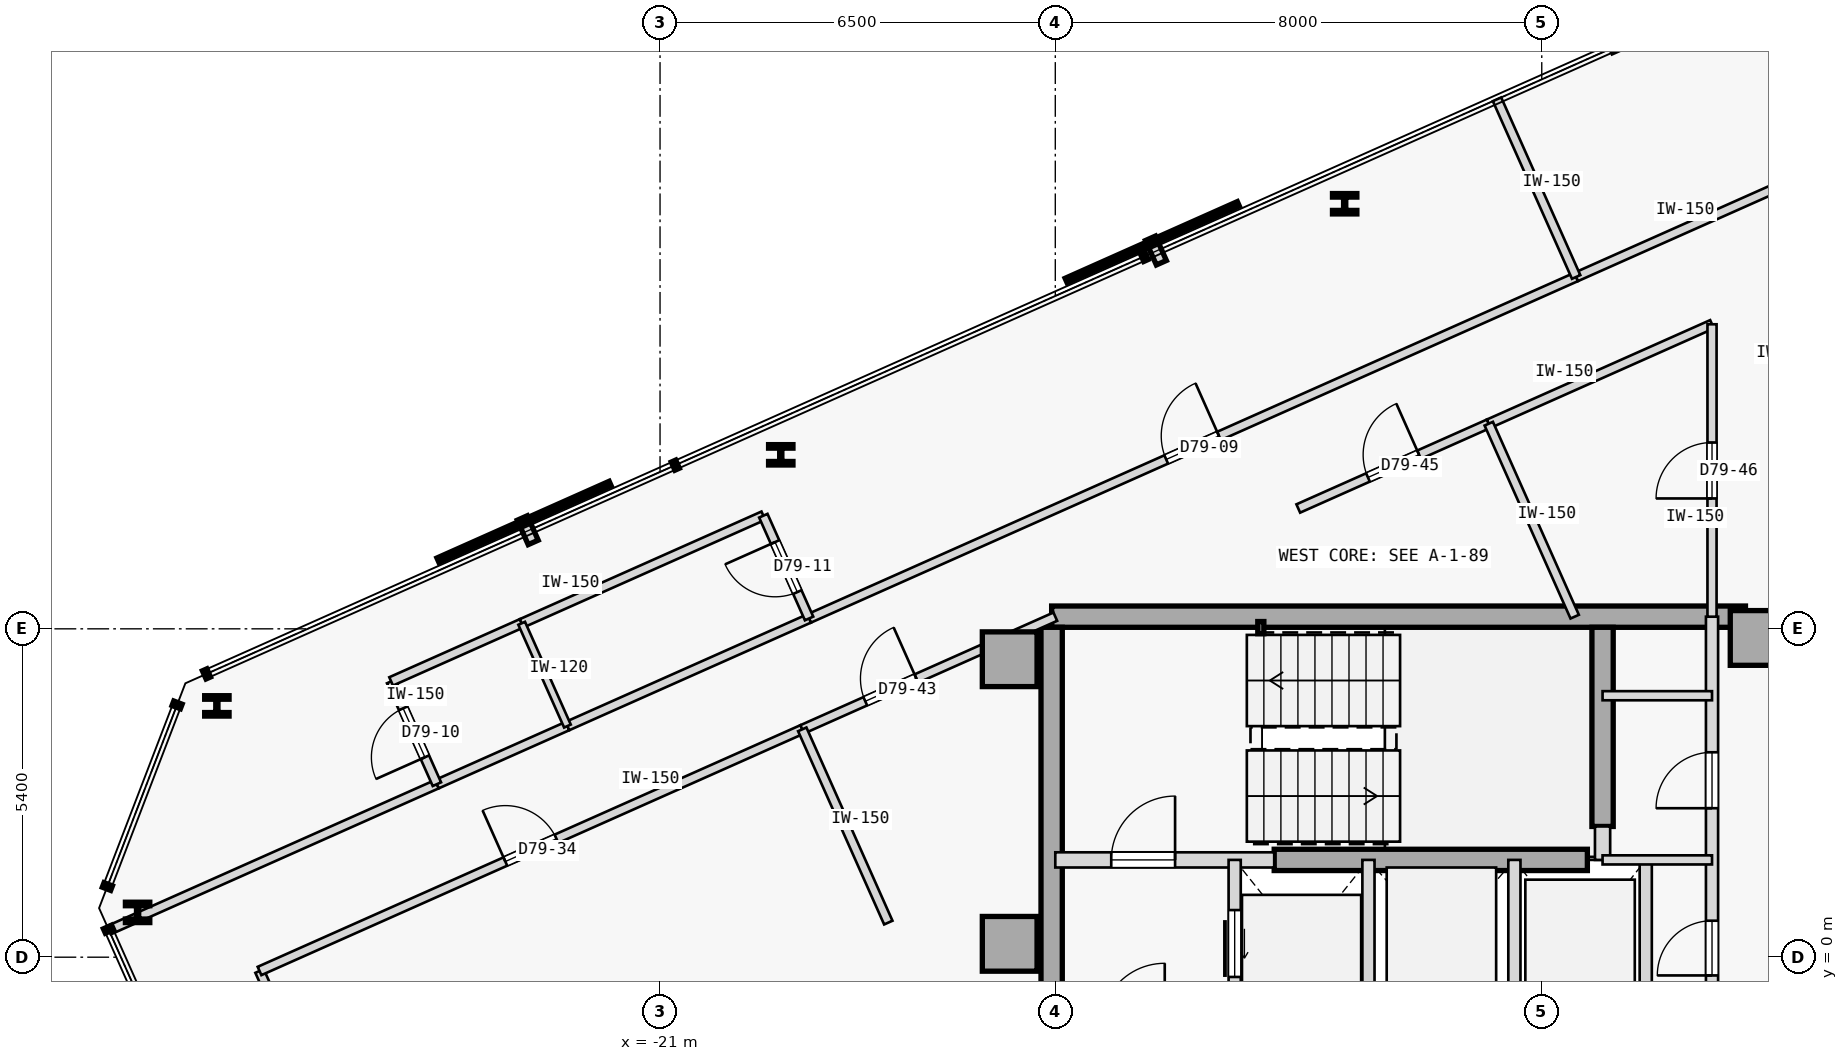
"""IFC4 building model, lengths in metres.
Left out: names, types, materials, properties, quantities, classifications, styles, units other than length and angle.
Written with IfcOpenShell. Run it as: python <this file> out.ifc"""

import sys

from ifc_helpers import new_model, si_unit, direction, frame, frame_2d, origin, origin_2d, place, context, subcontext, project, spatial, rectangle, hollow_rectangle, i_section, extrude, element, fill, save


model = new_model("IFC4")
c1 = context("Model", 3, precision=1e-05, world=origin(), true_north=direction((0.0, 1.0)))
c2 = subcontext(c1, "Body", "Model", "MODEL_VIEW")
j1 = project(units=[si_unit("LENGTHUNIT", "METRE"), si_unit("PLANEANGLEUNIT", "RADIAN")], contexts=[c1])
p1 = place(None, origin())
s1 = spatial("IfcSite", under=j1, at=p1, CompositionType="ELEMENT")
p2 = place(p1, origin())
s2 = spatial("IfcBuilding", under=s1, at=p2, CompositionType="ELEMENT")
p3 = place(p2, frame((0.0, 0.0, 295.3)))
s3 = spatial("IfcBuildingStorey", under=s2, at=p3, CompositionType="ELEMENT", Elevation=295.3)
for number, where, z_axis, x_axis in (
    (1, (-15.25, 4.9, 0.0), (0.0, 0.0, 1.0), (1.0, 0.0, 0.0)),
    (2, (-15.25, 0.22, 0.0), (0.0, 0.0, 1.0), (1.0, 0.0, 0.0)),
    (3, (-2.95, 5.25, 0.0), (0.0, 0.0, 1.0), (1.0, 0.0, 0.0)),
):
    element("IfcColumn", number, at=place(p3, frame(where, z_axis=z_axis, x_axis=x_axis)), inside=s3, PredefinedType="COLUMN", context=c2, shape_type="SweptSolid", body=[
        extrude(rectangle(XDim=0.9, YDim=0.9, at=origin_2d()), origin(), (0.0, 0.0, 1.0), 3.35),
    ])
p4 = place(p3, frame((-14.56, 5.6, 0.0), z_axis=(0.0, 0.0, 1.0), x_axis=(1.0, 0.0, 0.0)))
e4 = element("IfcWall", 4, at=p4, inside=s3, PredefinedType="SHEAR", context=c2, shape_type="SweptSolid", body=[
    extrude(rectangle(XDim=11.41, YDim=0.35, at=frame_2d((5.705, 0.0))), origin(), (0.0, 0.0, 1.0), 3.125),
])
p5 = place(p3, frame((-14.56, -5.425, 0.0), z_axis=(0.0, 0.0, 1.0), x_axis=(0.0, 1.0, 0.0)))
e5 = element("IfcWall", 5, at=p5, inside=s3, PredefinedType="SHEAR", context=c2, shape_type="SweptSolid", body=[
    extrude(rectangle(XDim=10.85, YDim=0.35, at=frame_2d((5.425, 0.0))), origin(), (0.0, 0.0, 1.0), 3.125),
])
p6 = place(p3, frame((-5.5, 2.15, 0.0), z_axis=(0.0, 0.0, 1.0), x_axis=(0.0, 1.0, 0.0)))
e6 = element("IfcWall", 6, at=p6, inside=s3, PredefinedType="SHEAR", context=c2, shape_type="SweptSolid", body=[
    extrude(rectangle(XDim=3.275, YDim=0.35, at=frame_2d((1.638, 0.0))), origin(), (0.0, 0.0, 1.0), 3.125),
])
p7 = place(p3, frame((-10.9, 1.6, 0.0), z_axis=(0.0, 0.0, 1.0), x_axis=(1.0, 0.0, 0.0)))
e7 = element("IfcWall", 7, at=p7, inside=s3, PredefinedType="SHEAR", context=c2, shape_type="SweptSolid", body=[
    extrude(rectangle(XDim=5.15, YDim=0.35, at=frame_2d((2.575, 0.0))), origin(), (0.0, 0.0, 1.0), 3.125),
])
p8 = place(p3, frame((-11.12, 5.42, 0.0), z_axis=(0.0, 0.0, 1.0), x_axis=(1.0, 0.0, 0.0)))
e8 = element("IfcColumn", 8, at=p8, inside=s3, PredefinedType="COLUMN", context=c2, shape_type="SweptSolid", body=[
    extrude(hollow_rectangle(XDim=0.1, YDim=0.2, WallThickness=0.008, at=origin_2d()), origin(), (0.0, 0.0, 1.0), 3.35),
])
for number, where, z_axis, x_axis in (
    (9, (-9.741, 12.39, 0.0), (0.0, 0.0, 1.0), (1.0, 0.0, 0.0)),
    (10, (-19.015, 8.262, 0.0), (0.0, 0.0, 1.0), (1.0, 0.0, 0.0)),
    (11, (-28.288, 4.133, 0.0), (0.0, 0.0, 1.0), (1.0, 0.0, 0.0)),
    (12, (-29.592, 0.737, 0.0), (0.0, 0.0, 1.0), (1.0, 0.0, 0.0)),
):
    element("IfcColumn", number, at=place(p3, frame(where, z_axis=z_axis, x_axis=x_axis)), inside=s3, PredefinedType="COLUMN", context=c2, shape_type="SweptSolid", body=[
        extrude(i_section(OverallWidth=0.401, OverallDepth=0.335, WebThickness=0.036, FlangeThickness=0.058, FilletRadius=0.015, at=origin_2d()), origin(), (0.0, 0.0, 1.0), 3.35),
    ])
p9 = place(p3, frame((-14.5, 1.6, 0.0), z_axis=(0.0, 0.0, 1.0), x_axis=(1.0, 0.0, 0.0)))
e13 = element("IfcWall", 13, at=p9, inside=s3, PredefinedType="STANDARD", context=c2, shape_type="SweptSolid", body=[
    extrude(rectangle(XDim=3.6, YDim=0.25, at=frame_2d((1.8, 0.0))), origin(), (0.0, 0.0, 1.0), 3.125),
])
p10 = place(p9, frame((0.92, 0.0, 0.0)))
e14 = element("IfcOpeningElement", 14, at=p10, cuts=e13, PredefinedType="OPENING", context=c2, shape_type="SweptSolid", body=[
    extrude(rectangle(XDim=1.05, YDim=2.15, at=frame_2d((0.525, 1.075))), frame((0.0, 0.135, 0.0), z_axis=(0.0, -1.0, 0.0), x_axis=(1.0, 0.0, 0.0)), (0.0, 0.0, 1.0), 0.27),
])
p11 = place(p3, frame((-5.5, 1.6, 0.0), z_axis=(0.0, 0.0, 1.0), x_axis=(0.0, 1.0, 0.0)))
e15 = element("IfcWall", 15, at=p11, inside=s3, PredefinedType="STANDARD", context=c2, shape_type="SweptSolid", body=[
    extrude(rectangle(XDim=0.55, YDim=0.25, at=frame_2d((0.275, 0.0))), origin(), (0.0, 0.0, 1.0), 3.125),
])
p12 = place(p3, frame((-3.7, -1.15, 0.0), z_axis=(0.0, 0.0, 1.0), x_axis=(0.0, 1.0, 0.0)))
e16 = element("IfcWall", 16, at=p12, inside=s3, PredefinedType="STANDARD", context=c2, shape_type="SweptSolid", body=[
    extrude(rectangle(XDim=6.75, YDim=0.2, at=frame_2d((3.375, 0.0))), origin(), (0.0, 0.0, 1.0), 3.125),
])
p13 = place(p12, frame((3.6, 0.0, 0.0)))
e17 = element("IfcOpeningElement", 17, at=p13, cuts=e16, PredefinedType="OPENING", context=c2, shape_type="SweptSolid", body=[
    extrude(rectangle(XDim=0.92, YDim=2.15, at=frame_2d((0.46, 1.075))), frame((0.0, 0.11, 0.0), z_axis=(0.0, -1.0, 0.0), x_axis=(1.0, 0.0, 0.0)), (0.0, 0.0, 1.0), 0.22),
])
p14 = place(p12, frame((0.85, 0.0, 0.0)))
e18 = element("IfcOpeningElement", 18, at=p14, cuts=e16, PredefinedType="OPENING", context=c2, shape_type="SweptSolid", body=[
    extrude(rectangle(XDim=0.9, YDim=2.15, at=frame_2d((0.45, 1.075))), frame((0.0, 0.11, 0.0), z_axis=(0.0, -1.0, 0.0), x_axis=(1.0, 0.0, 0.0)), (0.0, 0.0, 1.0), 0.22),
])
p15 = place(p3, frame((-11.55, -1.15, 0.0), z_axis=(0.0, 0.0, 1.0), x_axis=(0.0, 1.0, 0.0)))
e19 = element("IfcWall", 19, at=p15, inside=s3, PredefinedType="STANDARD", context=c2, shape_type="SweptSolid", body=[
    extrude(rectangle(XDim=2.75, YDim=0.2, at=frame_2d((1.375, 0.0))), origin(), (0.0, 0.0, 1.0), 3.125),
])
p16 = place(p15, frame((0.825, 0.0, 0.0)))
e20 = element("IfcOpeningElement", 20, at=p16, cuts=e19, PredefinedType="OPENING", context=c2, shape_type="SweptSolid", body=[
    extrude(rectangle(XDim=1.1, YDim=2.15, at=frame_2d((0.55, 1.075))), frame((0.0, 0.11, 0.0), z_axis=(0.0, -1.0, 0.0), x_axis=(1.0, 0.0, 0.0)), (0.0, 0.0, 1.0), 0.22),
])
for number, where, z_axis, x_axis in (
    (21, (-9.35, -1.15, 0.0), (0.0, 0.0, 1.0), (0.0, 1.0, 0.0)),
    (22, (-6.95, -1.15, 0.0), (0.0, 0.0, 1.0), (0.0, 1.0, 0.0)),
    (23, (-4.79, -1.15, 0.0), (0.0, 0.0, 1.0), (0.0, 1.0, 0.0)),
):
    element("IfcWall", number, at=place(p3, frame(where, z_axis=z_axis, x_axis=x_axis)), inside=s3, PredefinedType="STANDARD", context=c2, shape_type="SweptSolid", body=[
        extrude(rectangle(XDim=2.75, YDim=0.2, at=frame_2d((1.375, 0.0))), origin(), (0.0, 0.0, 1.0), 3.125),
    ])
for number, where, z_axis, x_axis in (
    (24, (-5.5, 4.3, 0.0), (0.0, 0.0, 1.0), (1.0, 0.0, 0.0)),
    (25, (-5.5, 1.6, 0.0), (0.0, 0.0, 1.0), (1.0, 0.0, 0.0)),
):
    element("IfcWall", number, at=place(p3, frame(where, z_axis=z_axis, x_axis=x_axis)), inside=s3, PredefinedType="PARTITIONING", context=c2, shape_type="SweptSolid", body=[
        extrude(rectangle(XDim=1.8, YDim=0.15, at=frame_2d((0.9, 0.0))), origin(), (0.0, 0.0, 1.0), 3.125),
    ])
p17 = place(p3, frame((-30.063, 0.444, 0.0), z_axis=(0.0, 0.0, 1.0), x_axis=(0.913545336501, 0.406736915165, 0.0)))
e26 = element("IfcWall", 26, at=p17, inside=s3, PredefinedType="PARTITIONING", context=c2, shape_type="SweptSolid", body=[
    extrude(rectangle(XDim=5.904, YDim=0.15, at=frame_2d((2.952, 0.0))), origin(), (0.0, 0.0, 1.0), 3.125),
])
p18 = place(p3, frame((-18.549, 5.57, 0.0), z_axis=(0.0, 0.0, 1.0), x_axis=(0.913545955058, 0.40673552586, 0.0)))
e27 = element("IfcWall", 27, at=p18, inside=s3, PredefinedType="PARTITIONING", context=c2, shape_type="SweptSolid", body=[
    extrude(rectangle(XDim=13.808, YDim=0.15, at=frame_2d((6.904, 0.0))), origin(), (0.0, 0.0, 1.0), 3.125),
])
p19 = place(p18, frame((6.429, 0.0, 0.0)))
e28 = element("IfcOpeningElement", 28, at=p19, cuts=e27, PredefinedType="OPENING", context=c2, shape_type="SweptSolid", body=[
    extrude(rectangle(XDim=0.95, YDim=2.15, at=frame_2d((0.475, 1.075))), frame((0.0, 0.085, 0.0), z_axis=(0.0, -1.0, 0.0), x_axis=(1.0, 0.0, 0.0)), (0.0, 0.0, 1.0), 0.17),
])
p20 = place(p3, frame((-24.67, 2.845, 0.0), z_axis=(0.0, 0.0, 1.0), x_axis=(0.913541436194, 0.406745675276, 0.0)))
e29 = element("IfcWall", 29, at=p20, inside=s3, PredefinedType="PARTITIONING", context=c2, shape_type="SweptSolid", body=[
    extrude(rectangle(XDim=2.35, YDim=0.15, at=frame_2d((1.175, 0.0))), origin(), (0.0, 0.0, 1.0), 3.125),
])
p21 = place(p3, frame((-22.523, 3.801, 0.0), z_axis=(0.0, 0.0, 1.0), x_axis=(0.913545193015, 0.406737237438, 0.0)))
e30 = element("IfcWall", 30, at=p21, inside=s3, PredefinedType="PARTITIONING", context=c2, shape_type="SweptSolid", body=[
    extrude(rectangle(XDim=4.35, YDim=0.15, at=frame_2d((2.175, 0.0))), origin(), (0.0, 0.0, 1.0), 3.125),
])
p22 = place(p3, frame((-5.935, 11.187, 0.0), z_axis=(0.0, 0.0, 1.0), x_axis=(0.91354851465, 0.406729776856, 0.0)))
e31 = element("IfcWall", 31, at=p22, inside=s3, PredefinedType="PARTITIONING", context=c2, shape_type="SweptSolid", body=[
    extrude(rectangle(XDim=6.703, YDim=0.15, at=frame_2d((3.352, 0.0))), origin(), (0.0, 0.0, 1.0), 3.125),
])
p23 = place(p3, frame((-24.54, -7.068, 0.0), z_axis=(0.0, 0.0, 1.0), x_axis=(-0.406758457302, 0.913535745011, 0.0)))
e32 = element("IfcWall", 32, at=p23, inside=s3, PredefinedType="PARTITIONING", context=c2, shape_type="SweptSolid", body=[
    extrude(rectangle(XDim=7.489, YDim=0.15, at=frame_2d((3.744, 0.0))), origin(), (0.0, 0.0, 1.0), 3.125),
])
p24 = place(p3, frame((-27.586, -0.227, 0.0), z_axis=(0.0, 0.0, 1.0), x_axis=(0.913542396088, 0.40674351937, 0.0)))
e33 = element("IfcWall", 33, at=p24, inside=s3, PredefinedType="PARTITIONING", context=c2, shape_type="SweptSolid", body=[
    extrude(rectangle(XDim=9.77, YDim=0.15, at=frame_2d((4.885, 0.0))), origin(), (0.0, 0.0, 1.0), 3.125),
])
p25 = place(p24, frame((4.425, 0.0, 0.0)))
e34 = element("IfcOpeningElement", 34, at=p25, cuts=e33, PredefinedType="OPENING", context=c2, shape_type="SweptSolid", body=[
    extrude(rectangle(XDim=0.92, YDim=2.15, at=frame_2d((0.46, 1.075))), frame((0.0, 0.085, 0.0), z_axis=(0.0, -1.0, 0.0), x_axis=(1.0, 0.0, 0.0)), (0.0, 0.0, 1.0), 0.17),
])
p26 = place(p3, frame((-18.661, 3.747, 0.0), z_axis=(0.0, 0.0, 1.0), x_axis=(0.913535055583, 0.40676000568, 0.0)))
e35 = element("IfcWall", 35, at=p26, inside=s3, PredefinedType="PARTITIONING", context=c2, shape_type="SweptSolid", body=[
    extrude(rectangle(XDim=4.555, YDim=0.15, at=frame_2d((2.277, 0.0))), origin(), (0.0, 0.0, 1.0), 3.125),
])
p27 = place(p26, frame((1.134, 0.0, 0.0)))
e36 = element("IfcOpeningElement", 36, at=p27, cuts=e35, PredefinedType="OPENING", context=c2, shape_type="SweptSolid", body=[
    extrude(rectangle(XDim=0.92, YDim=2.15, at=frame_2d((0.46, 1.075))), frame((0.0, 0.085, 0.0), z_axis=(0.0, -1.0, 0.0), x_axis=(1.0, 0.0, 0.0)), (0.0, 0.0, 1.0), 0.17),
])
p28 = place(p3, frame((-10.504, 7.379, 0.0), z_axis=(0.0, 0.0, 1.0), x_axis=(0.913526514415, 0.406779187596, 0.0)))
e37 = element("IfcWall", 37, at=p28, inside=s3, PredefinedType="PARTITIONING", context=c2, shape_type="SweptSolid", body=[
    extrude(rectangle(XDim=3.429, YDim=0.15, at=frame_2d((1.714, 0.0))), origin(), (0.0, 0.0, 1.0), 3.125),
])
p29 = place(p28, frame((1.254, 0.0, 0.0)))
e38 = element("IfcOpeningElement", 38, at=p29, cuts=e37, PredefinedType="OPENING", context=c2, shape_type="SweptSolid", body=[
    extrude(rectangle(XDim=0.92, YDim=2.15, at=frame_2d((0.46, 1.075))), frame((0.0, 0.085, 0.0), z_axis=(0.0, -1.0, 0.0), x_axis=(1.0, 0.0, 0.0)), (0.0, 0.0, 1.0), 0.17),
])
p30 = place(p3, frame((-7.372, 8.774, 0.0), z_axis=(0.0, 0.0, 1.0), x_axis=(0.913563383118, 0.406696379412, 0.0)))
e39 = element("IfcWall", 39, at=p30, inside=s3, PredefinedType="PARTITIONING", context=c2, shape_type="SweptSolid", body=[
    extrude(rectangle(XDim=4.019, YDim=0.15, at=frame_2d((2.01, 0.0))), origin(), (0.0, 0.0, 1.0), 3.125),
])
p31 = place(p3, frame((-3.7, 5.6, 0.0), z_axis=(0.0, 0.0, 1.0), x_axis=(5.077173e-05, 0.999999998711, 0.0)))
e40 = element("IfcWall", 40, at=p31, inside=s3, PredefinedType="PARTITIONING", context=c2, shape_type="SweptSolid", body=[
    extrude(rectangle(XDim=4.809, YDim=0.15, at=frame_2d((2.404, 0.0))), origin(), (0.0, 0.0, 1.0), 3.125),
])
p32 = place(p31, frame((1.944, 0.0, 0.0)))
e41 = element("IfcOpeningElement", 41, at=p32, cuts=e40, PredefinedType="OPENING", context=c2, shape_type="SweptSolid", body=[
    extrude(rectangle(XDim=0.92, YDim=2.15, at=frame_2d((0.46, 1.075))), frame((0.0, 0.085, 0.0), z_axis=(0.0, -1.0, 0.0), x_axis=(1.0, 0.0, 0.0)), (0.0, 0.0, 1.0), 0.17),
])
p33 = place(p3, frame((-24.67, 2.845, 0.0), z_axis=(0.0, 0.0, 1.0), x_axis=(-0.406701600856, 0.913561058639, 0.0)))
e42 = element("IfcWall", 42, at=p33, inside=s3, PredefinedType="PARTITIONING", context=c2, shape_type="SweptSolid", body=[
    extrude(rectangle(XDim=1.85, YDim=0.15, at=frame_2d((0.925, 0.0))), origin(), (0.0, 0.0, 1.0), 3.125),
])
p34 = place(p33, frame((0.485, 0.0, 0.0)))
e43 = element("IfcOpeningElement", 43, at=p34, cuts=e42, PredefinedType="OPENING", context=c2, shape_type="SweptSolid", body=[
    extrude(rectangle(XDim=0.88, YDim=2.15, at=frame_2d((0.44, 1.075))), frame((0.0, 0.085, 0.0), z_axis=(0.0, -1.0, 0.0), x_axis=(1.0, 0.0, 0.0)), (0.0, 0.0, 1.0), 0.17),
])
p35 = place(p3, frame((-25.422, 4.535, 0.0), z_axis=(0.0, 0.0, 1.0), x_axis=(0.913541436194, 0.406745675276, 0.0)))
e44 = element("IfcWall", 44, at=p35, inside=s3, PredefinedType="PARTITIONING", context=c2, shape_type="SweptSolid", body=[
    extrude(rectangle(XDim=2.35, YDim=0.15, at=frame_2d((1.175, 0.0))), origin(), (0.0, 0.0, 1.0), 3.125),
])
p36 = place(p3, frame((-23.275, 5.491, 0.0), z_axis=(0.0, 0.0, 1.0), x_axis=(0.913545193015, 0.406737237438, 0.0)))
e45 = element("IfcWall", 45, at=p36, inside=s3, PredefinedType="PARTITIONING", context=c2, shape_type="SweptSolid", body=[
    extrude(rectangle(XDim=4.35, YDim=0.15, at=frame_2d((2.175, 0.0))), origin(), (0.0, 0.0, 1.0), 3.125),
])
p37 = place(p3, frame((-18.549, 5.57, 0.0), z_axis=(0.0, 0.0, 1.0), x_axis=(-0.406701600856, 0.913561058639, 0.0)))
e46 = element("IfcWall", 46, at=p37, inside=s3, PredefinedType="PARTITIONING", context=c2, shape_type="SweptSolid", body=[
    extrude(rectangle(XDim=1.85, YDim=0.15, at=frame_2d((0.925, 0.0))), origin(), (0.0, 0.0, 1.0), 3.125),
])
p38 = place(p37, frame((0.475, 0.0, 0.0)))
e47 = element("IfcOpeningElement", 47, at=p38, cuts=e46, PredefinedType="OPENING", context=c2, shape_type="SweptSolid", body=[
    extrude(rectangle(XDim=0.9, YDim=2.15, at=frame_2d((0.45, 1.075))), frame((0.0, 0.085, 0.0), z_axis=(0.0, -1.0, 0.0), x_axis=(1.0, 0.0, 0.0)), (0.0, 0.0, 1.0), 0.17),
])
p39 = place(p3, frame((-5.935, 11.187, 0.0), z_axis=(0.0, 0.0, 1.0), x_axis=(-0.406733350739, 0.913546923478, 0.0)))
e48 = element("IfcWall", 48, at=p39, inside=s3, PredefinedType="PARTITIONING", context=c2, shape_type="SweptSolid", body=[
    extrude(rectangle(XDim=3.198, YDim=0.15, at=frame_2d((1.599, 0.0))), origin(), (0.0, 0.0, 1.0), 3.125),
])
p40 = place(p3, frame((-22.523, 3.801, 0.0), z_axis=(0.0, 0.0, 1.0), x_axis=(-0.406701600856, 0.913561058639, 0.0)))
e49 = element("IfcWall", 49, at=p40, inside=s3, PredefinedType="PARTITIONING", context=c2, shape_type="SweptSolid", body=[
    extrude(rectangle(XDim=1.85, YDim=0.12, at=frame_2d((0.925, 0.0))), origin(), (0.0, 0.0, 1.0), 3.125),
])
p41 = place(p3, frame((-17.246, 0.569, 0.0), z_axis=(0.0, 0.0, 1.0), x_axis=(-0.40673740295, 0.913545119324, 0.0)))
e50 = element("IfcWall", 50, at=p41, inside=s3, PredefinedType="PARTITIONING", context=c2, shape_type="SweptSolid", body=[
    extrude(rectangle(XDim=3.479, YDim=0.15, at=frame_2d((1.74, 0.0))), origin(), (0.0, 0.0, 1.0), 3.125),
])
p42 = place(p3, frame((-5.958, 5.6, 0.0), z_axis=(0.0, 0.0, 1.0), x_axis=(-0.406738231884, 0.913544750258, 0.0)))
e51 = element("IfcWall", 51, at=p42, inside=s3, PredefinedType="PARTITIONING", context=c2, shape_type="SweptSolid", body=[
    extrude(rectangle(XDim=3.474, YDim=0.15, at=frame_2d((1.737, 0.0))), origin(), (0.0, 0.0, 1.0), 3.125),
])
p43 = place(p10, origin())
e52 = element("IfcDoor", 52, at=p43, inside=s3, OperationType="SINGLE_SWING_RIGHT", PredefinedType="DOOR", context=c2, shape_type="SweptSolid", body=[
    extrude(rectangle(XDim=1.05, YDim=2.15, at=frame_2d((0.525, 1.075))), frame((0.0, 0.025, 0.0), z_axis=(0.0, -1.0, 0.0), x_axis=(1.0, 0.0, 0.0)), (0.0, 0.0, 1.0), 0.05),
])
fill(e14, e52)
p44 = place(p16, origin())
e53 = element("IfcDoor", 53, at=p44, inside=s3, OperationType="SLIDING_TO_RIGHT", PredefinedType="DOOR", context=c2, shape_type="SweptSolid", body=[
    extrude(rectangle(XDim=1.1, YDim=2.15, at=frame_2d((0.55, 1.075))), frame((0.0, 0.025, 0.0), z_axis=(0.0, -1.0, 0.0), x_axis=(1.0, 0.0, 0.0)), (0.0, 0.0, 1.0), 0.05),
])
fill(e20, e53)
p45 = place(p13, origin())
e54 = element("IfcDoor", 54, at=p45, inside=s3, OperationType="SINGLE_SWING_LEFT", PredefinedType="DOOR", context=c2, shape_type="SweptSolid", body=[
    extrude(rectangle(XDim=0.92, YDim=2.15, at=frame_2d((0.46, 1.075))), frame((0.0, 0.025, 0.0), z_axis=(0.0, -1.0, 0.0), x_axis=(1.0, 0.0, 0.0)), (0.0, 0.0, 1.0), 0.05),
])
fill(e17, e54)
p46 = place(p14, origin())
e55 = element("IfcDoor", 55, at=p46, inside=s3, OperationType="SINGLE_SWING_LEFT", PredefinedType="DOOR", context=c2, shape_type="SweptSolid", body=[
    extrude(rectangle(XDim=0.9, YDim=2.15, at=frame_2d((0.45, 1.075))), frame((0.0, 0.025, 0.0), z_axis=(0.0, -1.0, 0.0), x_axis=(1.0, 0.0, 0.0)), (0.0, 0.0, 1.0), 0.05),
])
fill(e18, e55)
p47 = place(p19, origin())
e56 = element("IfcDoor", 56, at=p47, inside=s3, OperationType="SINGLE_SWING_RIGHT", PredefinedType="DOOR", context=c2, shape_type="SweptSolid", body=[
    extrude(rectangle(XDim=0.95, YDim=2.15, at=frame_2d((0.475, 1.075))), frame((0.0, 0.025, 0.0), z_axis=(0.0, -1.0, 0.0), x_axis=(1.0, 0.0, 0.0)), (0.0, 0.0, 1.0), 0.05),
])
fill(e28, e56)
p48 = place(p34, origin())
e57 = element("IfcDoor", 57, at=p48, inside=s3, OperationType="SINGLE_SWING_LEFT", PredefinedType="DOOR", context=c2, shape_type="SweptSolid", body=[
    extrude(rectangle(XDim=0.88, YDim=2.15, at=frame_2d((0.44, 1.075))), frame((0.0, 0.025, 0.0), z_axis=(0.0, -1.0, 0.0), x_axis=(1.0, 0.0, 0.0)), (0.0, 0.0, 1.0), 0.05),
])
fill(e43, e57)
p49 = place(p38, origin())
e58 = element("IfcDoor", 58, at=p49, inside=s3, OperationType="SINGLE_SWING_RIGHT", PredefinedType="DOOR", context=c2, shape_type="SweptSolid", body=[
    extrude(rectangle(XDim=0.9, YDim=2.15, at=frame_2d((0.45, 1.075))), frame((0.0, 0.025, 0.0), z_axis=(0.0, -1.0, 0.0), x_axis=(1.0, 0.0, 0.0)), (0.0, 0.0, 1.0), 0.05),
])
fill(e47, e58)
p50 = place(p25, origin())
e59 = element("IfcDoor", 59, at=p50, inside=s3, OperationType="SINGLE_SWING_LEFT", PredefinedType="DOOR", context=c2, shape_type="SweptSolid", body=[
    extrude(rectangle(XDim=0.92, YDim=2.15, at=frame_2d((0.46, 1.075))), frame((0.0, 0.025, 0.0), z_axis=(0.0, -1.0, 0.0), x_axis=(1.0, 0.0, 0.0)), (0.0, 0.0, 1.0), 0.05),
])
fill(e34, e59)
p51 = place(p27, origin())
e60 = element("IfcDoor", 60, at=p51, inside=s3, OperationType="SINGLE_SWING_RIGHT", PredefinedType="DOOR", context=c2, shape_type="SweptSolid", body=[
    extrude(rectangle(XDim=0.92, YDim=2.15, at=frame_2d((0.46, 1.075))), frame((0.0, 0.025, 0.0), z_axis=(0.0, -1.0, 0.0), x_axis=(1.0, 0.0, 0.0)), (0.0, 0.0, 1.0), 0.05),
])
fill(e36, e60)
p52 = place(p29, origin())
e61 = element("IfcDoor", 61, at=p52, inside=s3, OperationType="SINGLE_SWING_RIGHT", PredefinedType="DOOR", context=c2, shape_type="SweptSolid", body=[
    extrude(rectangle(XDim=0.92, YDim=2.15, at=frame_2d((0.46, 1.075))), frame((0.0, 0.025, 0.0), z_axis=(0.0, -1.0, 0.0), x_axis=(1.0, 0.0, 0.0)), (0.0, 0.0, 1.0), 0.05),
])
fill(e38, e61)
p53 = place(p32, origin())
e62 = element("IfcDoor", 62, at=p53, inside=s3, OperationType="SINGLE_SWING_LEFT", PredefinedType="DOOR", context=c2, shape_type="SweptSolid", body=[
    extrude(rectangle(XDim=0.92, YDim=2.15, at=frame_2d((0.46, 1.075))), frame((0.0, 0.025, 0.0), z_axis=(0.0, -1.0, 0.0), x_axis=(1.0, 0.0, 0.0)), (0.0, 0.0, 1.0), 0.05),
])
fill(e41, e62)
save(model, sys.argv[1])
